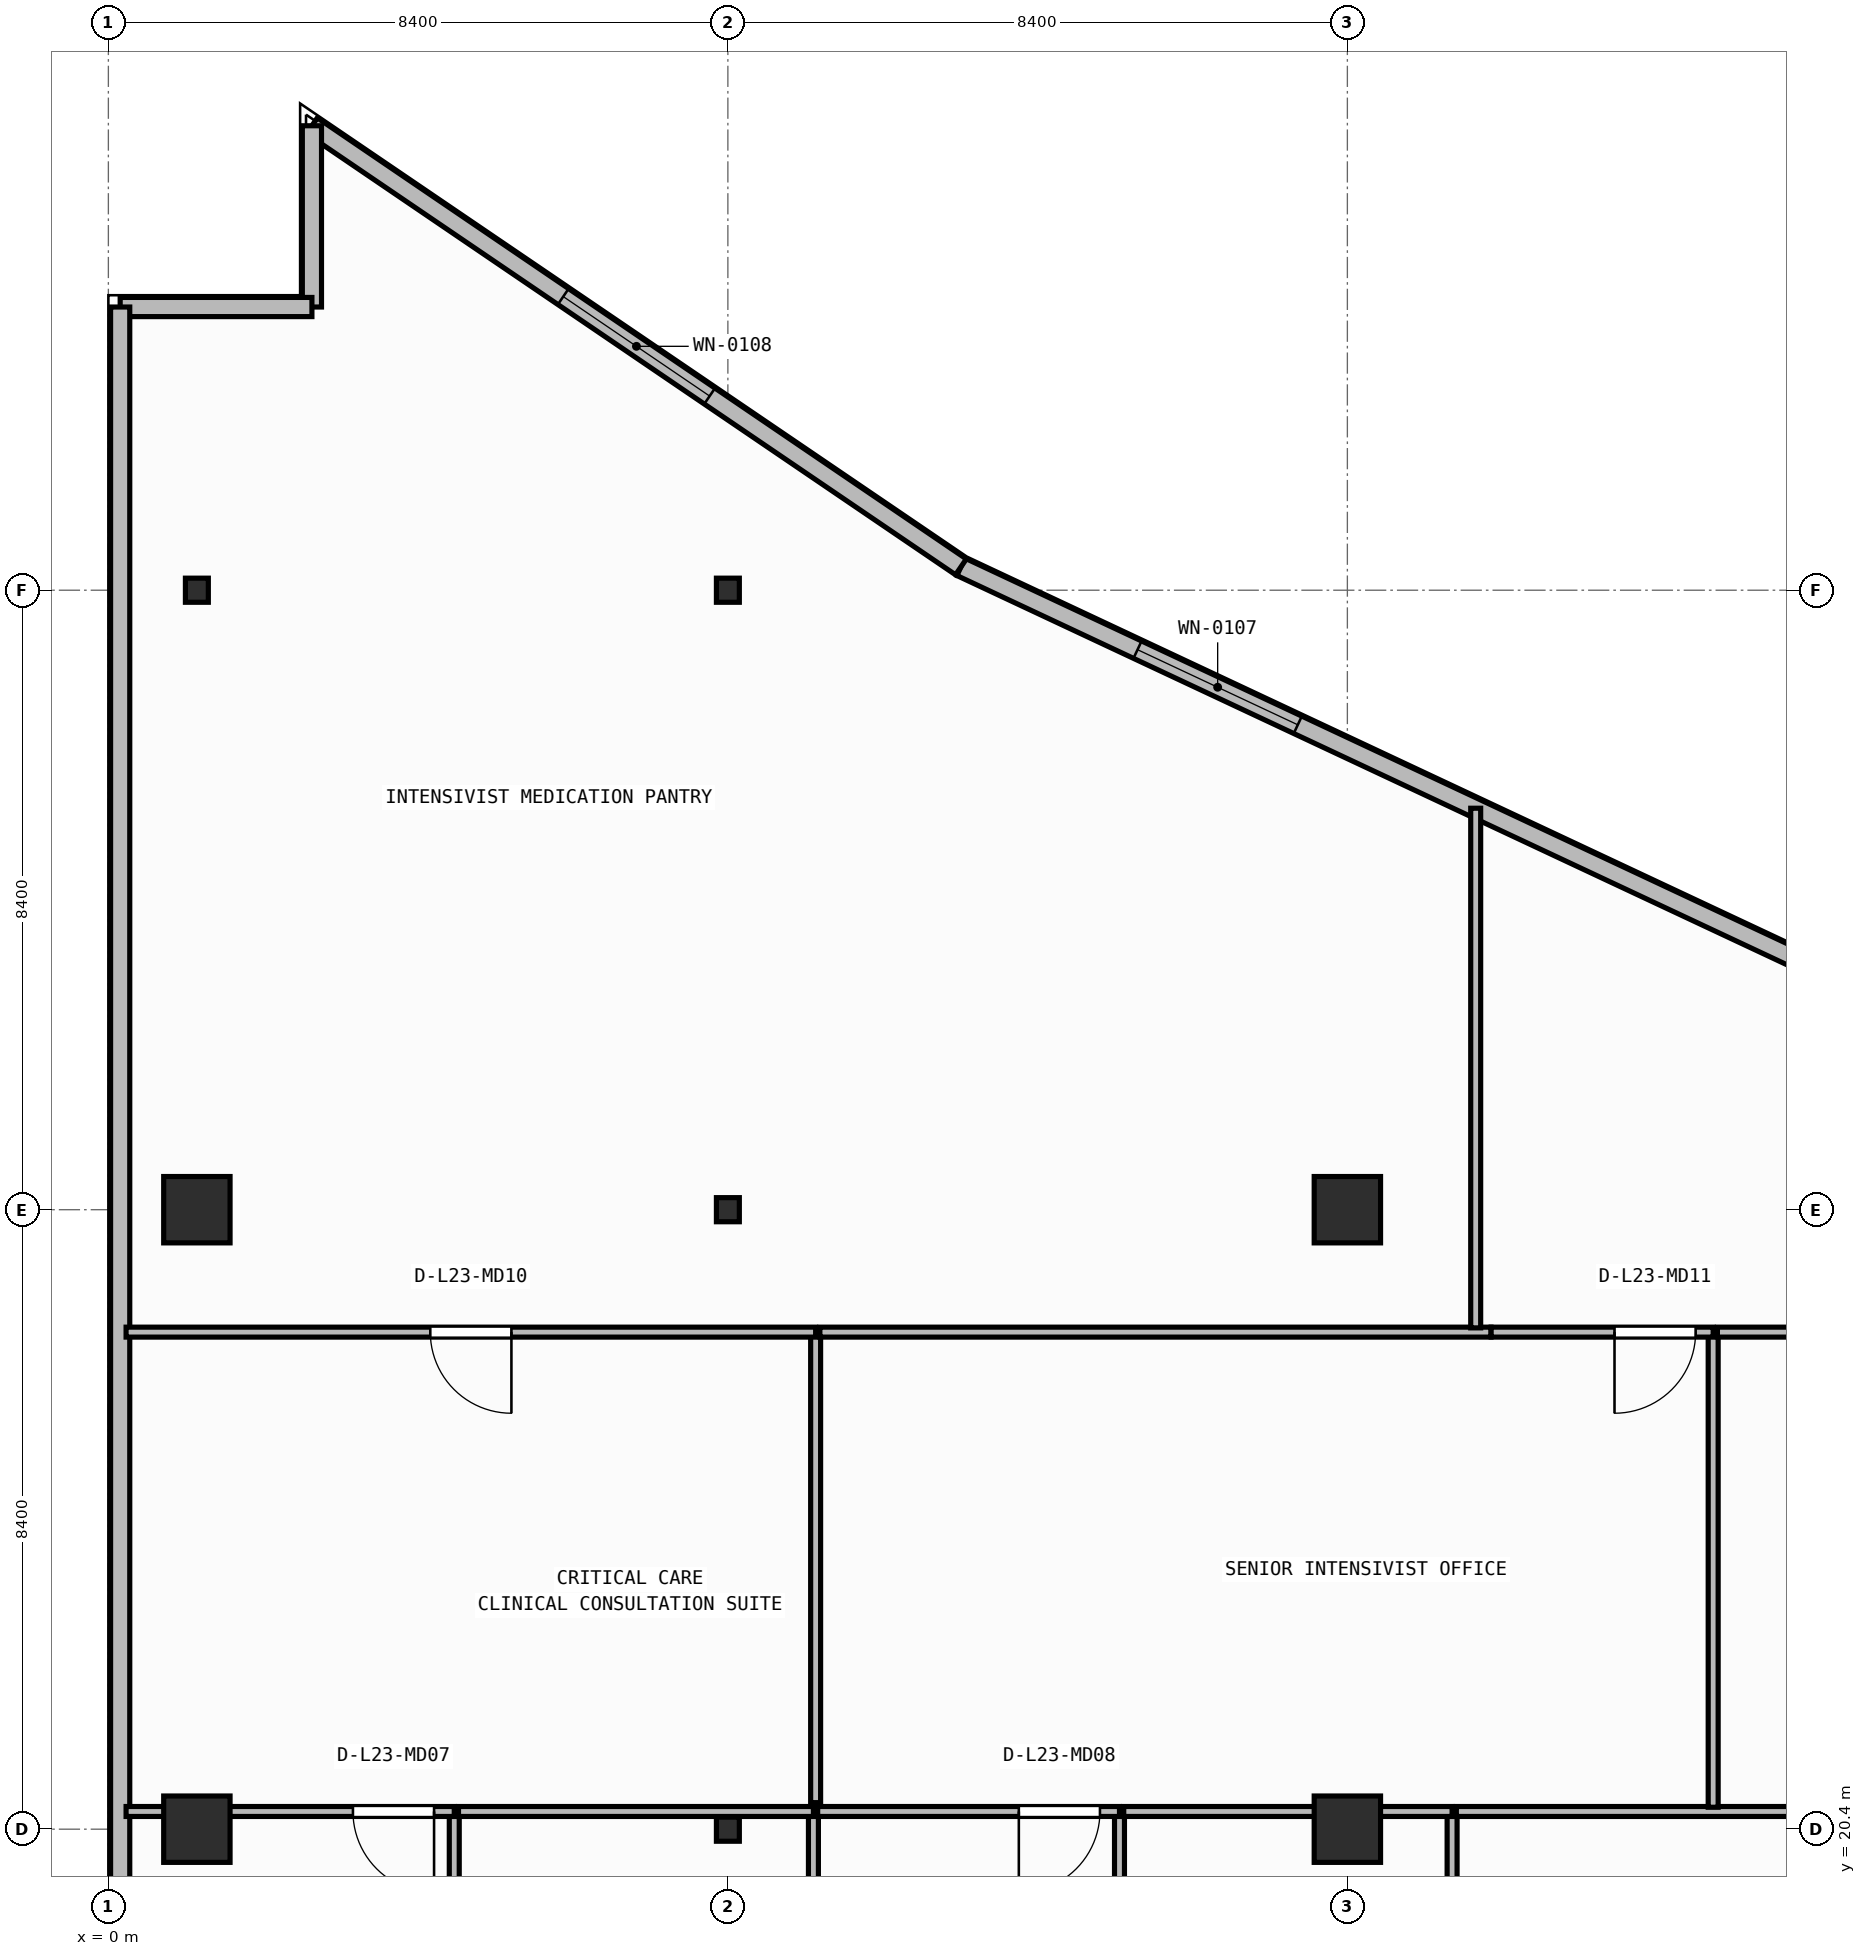
"""IFC4 building model, lengths in metres.
Left out: names, types, materials, properties, quantities, classifications, styles, units other than length and angle.
Written with IfcOpenShell. Run it as: python <this file> out.ifc"""

import sys

from ifc_helpers import new_model, si_unit, direction, frame, frame_2d, origin, origin_2d, place, context, subcontext, project, spatial, rectangle, i_section, extrude, element, fill, save


model = new_model("IFC4")
c1 = context("Model", 3, precision=1e-05, world=origin(), true_north=direction((0.0, 1.0)))
c2 = subcontext(c1, "Body", "Model", "MODEL_VIEW")
j1 = project(units=[si_unit("LENGTHUNIT", "METRE"), si_unit("PLANEANGLEUNIT", "RADIAN")], contexts=[c1])
p1 = place(None, origin())
s1 = spatial("IfcSite", under=j1, at=p1, CompositionType="ELEMENT")
p2 = place(p1, origin())
s2 = spatial("IfcBuilding", under=s1, at=p2, CompositionType="ELEMENT")
p3 = place(p2, frame((0.0, 0.0, 93.6)))
s3 = spatial("IfcBuildingStorey", under=s2, at=p3, CompositionType="ELEMENT", Elevation=93.6)
p4 = place(p3, frame((1.2, 20.4, 0.0), z_axis=(0.0, 0.0, 1.0), x_axis=(1.0, 0.0, 0.0)))
e1 = element("IfcColumn", 1, at=p4, inside=s3, PredefinedType="COLUMN", context=c2, shape_type="SweptSolid", body=[
    extrude(rectangle(XDim=0.9, YDim=0.9, at=origin_2d()), origin(), (0.0, 0.0, 1.0), 3.95),
])
p5 = place(p3, frame((8.4, 20.4, 0.0), z_axis=(0.0, 0.0, 1.0), x_axis=(1.0, 0.0, 0.0)))
e2 = element("IfcColumn", 2, at=p5, inside=s3, PredefinedType="COLUMN", context=c2, shape_type="SweptSolid", body=[
    extrude(i_section(OverallWidth=0.311, OverallDepth=0.327, WebThickness=0.016, FlangeThickness=0.025, FilletRadius=0.017, at=origin_2d()), origin(), (0.0, 0.0, 1.0), 3.95),
])
for number, where, z_axis, x_axis in (
    (3, (16.8, 20.4, 0.0), (0.0, 0.0, 1.0), (1.0, 0.0, 0.0)),
    (4, (1.2, 28.8, 0.0), (0.0, 0.0, 1.0), (1.0, 0.0, 0.0)),
):
    element("IfcColumn", number, at=place(p3, frame(where, z_axis=z_axis, x_axis=x_axis)), inside=s3, PredefinedType="COLUMN", context=c2, shape_type="SweptSolid", body=[
        extrude(rectangle(XDim=0.9, YDim=0.9, at=origin_2d()), origin(), (0.0, 0.0, 1.0), 3.95),
    ])
p6 = place(p3, frame((8.4, 28.8, 0.0), z_axis=(0.0, 0.0, 1.0), x_axis=(1.0, 0.0, 0.0)))
e5 = element("IfcColumn", 5, at=p6, inside=s3, PredefinedType="COLUMN", context=c2, shape_type="SweptSolid", body=[
    extrude(i_section(OverallWidth=0.311, OverallDepth=0.327, WebThickness=0.016, FlangeThickness=0.025, FilletRadius=0.017, at=origin_2d()), origin(), (0.0, 0.0, 1.0), 3.95),
])
p7 = place(p3, frame((16.8, 28.8, 0.0), z_axis=(0.0, 0.0, 1.0), x_axis=(1.0, 0.0, 0.0)))
e6 = element("IfcColumn", 6, at=p7, inside=s3, PredefinedType="COLUMN", context=c2, shape_type="SweptSolid", body=[
    extrude(rectangle(XDim=0.9, YDim=0.9, at=origin_2d()), origin(), (0.0, 0.0, 1.0), 3.95),
])
for number, where, z_axis, x_axis in (
    (7, (1.2, 37.2, 0.0), (0.0, 0.0, 1.0), (1.0, 0.0, 0.0)),
    (8, (8.4, 37.2, 0.0), (0.0, 0.0, 1.0), (1.0, 0.0, 0.0)),
):
    element("IfcColumn", number, at=place(p3, frame(where, z_axis=z_axis, x_axis=x_axis)), inside=s3, PredefinedType="COLUMN", context=c2, shape_type="SweptSolid", body=[
        extrude(i_section(OverallWidth=0.311, OverallDepth=0.327, WebThickness=0.016, FlangeThickness=0.025, FilletRadius=0.017, at=origin_2d()), origin(), (0.0, 0.0, 1.0), 3.95),
    ])
p8 = place(p3, frame((24.408, 31.492, 0.0), z_axis=(0.0, 0.0, 1.0), x_axis=(-0.905396522918, 0.424566998585, 0.0)))
e9 = element("IfcWall", 9, at=p8, inside=s3, PredefinedType="STANDARD", context=c2, shape_type="SweptSolid", body=[
    extrude(rectangle(XDim=14.189, YDim=0.26, at=frame_2d((7.095, 0.0))), origin(), (0.0, 0.0, 1.0), 3.67),
])
p9 = place(p8, frame((9.145, 0.0, 0.9)))
e10 = element("IfcOpeningElement", 10, at=p9, cuts=e9, PredefinedType="OPENING", context=c2, shape_type="SweptSolid", body=[
    extrude(rectangle(XDim=2.4, YDim=1.65, at=frame_2d((1.2, 0.825))), frame((0.0, 0.14, 0.0), z_axis=(0.0, -1.0, 0.0), x_axis=(1.0, 0.0, 0.0)), (0.0, 0.0, 1.0), 0.28),
])
p10 = place(p3, frame((11.561, 37.517, 0.0), z_axis=(0.0, 0.0, 1.0), x_axis=(-0.827064743936, 0.562106670782, 0.0)))
e11 = element("IfcWall", 11, at=p10, inside=s3, PredefinedType="STANDARD", context=c2, shape_type="SweptSolid", body=[
    extrude(rectangle(XDim=10.641, YDim=0.26, at=frame_2d((5.32, 0.0))), origin(), (0.0, 0.0, 1.0), 3.67),
])
p11 = place(p10, frame((4.12, 0.0, 0.9)))
e12 = element("IfcOpeningElement", 12, at=p11, cuts=e11, PredefinedType="OPENING", context=c2, shape_type="SweptSolid", body=[
    extrude(rectangle(XDim=2.4, YDim=1.65, at=frame_2d((1.2, 0.825))), frame((0.0, 0.14, 0.0), z_axis=(0.0, -1.0, 0.0), x_axis=(1.0, 0.0, 0.0)), (0.0, 0.0, 1.0), 0.28),
])
p12 = place(p3, frame((2.76, 43.498, 0.0), z_axis=(0.0, 0.0, 1.0), x_axis=(0.0, -1.0, 0.0)))
e13 = element("IfcWall", 13, at=p12, inside=s3, PredefinedType="STANDARD", context=c2, shape_type="SweptSolid", body=[
    extrude(rectangle(XDim=2.458, YDim=0.26, at=frame_2d((1.229, 0.0))), origin(), (0.0, 0.0, 1.0), 3.67),
])
p13 = place(p3, frame((2.76, 41.04, 0.0), z_axis=(0.0, 0.0, 1.0), x_axis=(-1.0, 0.0, 0.0)))
e14 = element("IfcWall", 14, at=p13, inside=s3, PredefinedType="STANDARD", context=c2, shape_type="SweptSolid", body=[
    extrude(rectangle(XDim=2.6, YDim=0.26, at=frame_2d((1.3, 0.0))), origin(), (0.0, 0.0, 1.0), 3.67),
])
p14 = place(p3, frame((0.16, 41.04, 0.0), z_axis=(0.0, 0.0, 1.0), x_axis=(0.0, -1.0, 0.0)))
e15 = element("IfcWall", 15, at=p14, inside=s3, PredefinedType="STANDARD", context=c2, shape_type="SweptSolid", body=[
    extrude(rectangle(XDim=38.28, YDim=0.26, at=frame_2d((19.14, 0.0))), origin(), (0.0, 0.0, 1.0), 3.67),
])
p15 = place(p14, frame((28.15, 0.0, 0.9)))
e16 = element("IfcOpeningElement", 16, at=p15, cuts=e15, PredefinedType="OPENING", context=c2, shape_type="SweptSolid", body=[
    extrude(rectangle(XDim=2.4, YDim=1.65, at=frame_2d((1.2, 0.825))), frame((0.0, 0.14, 0.0), z_axis=(0.0, -1.0, 0.0), x_axis=(1.0, 0.0, 0.0)), (0.0, 0.0, 1.0), 0.28),
])
p16 = place(p3, frame((4.69, 18.04, 0.0), z_axis=(0.0, 0.0, 1.0), x_axis=(0.0, 1.0, 0.0)))
e17 = element("IfcWall", 17, at=p16, inside=s3, PredefinedType="PARTITIONING", context=c2, shape_type="SweptSolid", body=[
    extrude(rectangle(XDim=2.6, YDim=0.135, at=frame_2d((1.3, 0.0))), origin(), (0.0, 0.0, 1.0), 3.67),
])
p17 = place(p3, frame((4.69, 20.64, 0.0), z_axis=(0.0, 0.0, 1.0), x_axis=(-1.0, 0.0, 0.0)))
e18 = element("IfcWall", 18, at=p17, inside=s3, PredefinedType="PARTITIONING", context=c2, shape_type="SweptSolid", body=[
    extrude(rectangle(XDim=4.45, YDim=0.135, at=frame_2d((2.225, 0.0))), origin(), (0.0, 0.0, 1.0), 3.033),
])
p18 = place(p17, frame((0.274, 0.0, 0.0)))
e19 = element("IfcOpeningElement", 19, at=p18, cuts=e18, PredefinedType="OPENING", context=c2, shape_type="SweptSolid", body=[
    extrude(rectangle(XDim=1.1, YDim=2.1, at=frame_2d((0.55, 1.05))), frame((0.0, 0.077, 0.0), z_axis=(0.0, -1.0, 0.0), x_axis=(1.0, 0.0, 0.0)), (0.0, 0.0, 1.0), 0.155),
])
p19 = place(p3, frame((9.56, 17.833, 0.0), z_axis=(0.0, 0.0, 1.0), x_axis=(0.0, 1.0, 0.0)))
e20 = element("IfcWall", 20, at=p19, inside=s3, PredefinedType="PARTITIONING", context=c2, shape_type="SweptSolid", body=[
    extrude(rectangle(XDim=2.807, YDim=0.135, at=frame_2d((1.404, 0.0))), origin(), (0.0, 0.0, 1.0), 3.67),
])
p20 = place(p3, frame((9.56, 20.64, 0.0), z_axis=(0.0, 0.0, 1.0), x_axis=(-1.0, 0.0, 0.0)))
e21 = element("IfcWall", 21, at=p20, inside=s3, PredefinedType="PARTITIONING", context=c2, shape_type="SweptSolid", body=[
    extrude(rectangle(XDim=4.812, YDim=0.135, at=frame_2d((2.406, 0.0))), origin(), (0.0, 0.0, 1.0), 3.033),
])
p21 = place(p3, frame((13.71, 14.76, 0.0), z_axis=(0.0, 0.0, 1.0), x_axis=(0.0, 1.0, 0.0)))
e22 = element("IfcWall", 22, at=p21, inside=s3, PredefinedType="PARTITIONING", context=c2, shape_type="SweptSolid", body=[
    extrude(rectangle(XDim=5.88, YDim=0.135, at=frame_2d((2.94, 0.0))), origin(), (0.0, 0.0, 1.0), 3.67),
])
p22 = place(p3, frame((13.71, 20.64, 0.0), z_axis=(0.0, 0.0, 1.0), x_axis=(-1.0, 0.0, 0.0)))
e23 = element("IfcWall", 23, at=p22, inside=s3, PredefinedType="PARTITIONING", context=c2, shape_type="SweptSolid", body=[
    extrude(rectangle(XDim=4.093, YDim=0.135, at=frame_2d((2.046, 0.0))), origin(), (0.0, 0.0, 1.0), 3.033),
])
p23 = place(p22, frame((0.265, 0.0, 0.0)))
e24 = element("IfcOpeningElement", 24, at=p23, cuts=e23, PredefinedType="OPENING", context=c2, shape_type="SweptSolid", body=[
    extrude(rectangle(XDim=1.1, YDim=2.1, at=frame_2d((0.55, 1.05))), frame((0.0, 0.077, 0.0), z_axis=(0.0, -1.0, 0.0), x_axis=(1.0, 0.0, 0.0)), (0.0, 0.0, 1.0), 0.155),
])
p24 = place(p3, frame((18.22, 17.833, 0.0), z_axis=(0.0, 0.0, 1.0), x_axis=(0.0, 1.0, 0.0)))
e25 = element("IfcWall", 25, at=p24, inside=s3, PredefinedType="PARTITIONING", context=c2, shape_type="SweptSolid", body=[
    extrude(rectangle(XDim=2.807, YDim=0.135, at=frame_2d((1.404, 0.0))), origin(), (0.0, 0.0, 1.0), 3.67),
])
p25 = place(p3, frame((18.22, 20.64, 0.0), z_axis=(0.0, 0.0, 1.0), x_axis=(-1.0, 0.0, 0.0)))
e26 = element("IfcWall", 26, at=p25, inside=s3, PredefinedType="PARTITIONING", context=c2, shape_type="SweptSolid", body=[
    extrude(rectangle(XDim=4.452, YDim=0.135, at=frame_2d((2.226, 0.0))), origin(), (0.0, 0.0, 1.0), 3.033),
])
p26 = place(p3, frame((23.032, 20.64, 0.0), z_axis=(0.0, 0.0, 1.0), x_axis=(-1.0, 0.0, 0.0)))
e27 = element("IfcWall", 27, at=p26, inside=s3, PredefinedType="PARTITIONING", context=c2, shape_type="SweptSolid", body=[
    extrude(rectangle(XDim=4.755, YDim=0.135, at=frame_2d((2.377, 0.0))), origin(), (0.0, 0.0, 1.0), 3.033),
])
p27 = place(p3, frame((9.59, 20.76, 0.0), z_axis=(0.0, 0.0, 1.0), x_axis=(0.0, 1.0, 0.0)))
e28 = element("IfcWall", 28, at=p27, inside=s3, PredefinedType="PARTITIONING", context=c2, shape_type="SweptSolid", body=[
    extrude(rectangle(XDim=6.38, YDim=0.135, at=frame_2d((3.19, 0.0))), origin(), (0.0, 0.0, 1.0), 3.67),
])
p28 = place(p3, frame((9.59, 27.14, 0.0), z_axis=(0.0, 0.0, 1.0), x_axis=(-1.0, 0.0, 0.0)))
e29 = element("IfcWall", 29, at=p28, inside=s3, PredefinedType="PARTITIONING", context=c2, shape_type="SweptSolid", body=[
    extrude(rectangle(XDim=9.35, YDim=0.135, at=frame_2d((4.675, 0.0))), origin(), (0.0, 0.0, 1.0), 3.67),
])
p29 = place(p28, frame((4.125, 0.0, 0.0)))
e30 = element("IfcOpeningElement", 30, at=p29, cuts=e29, PredefinedType="OPENING", context=c2, shape_type="SweptSolid", body=[
    extrude(rectangle(XDim=1.1, YDim=2.1, at=frame_2d((0.55, 1.05))), frame((0.0, 0.077, 0.0), z_axis=(0.0, -1.0, 0.0), x_axis=(1.0, 0.0, 0.0)), (0.0, 0.0, 1.0), 0.155),
])
p30 = place(p3, frame((21.76, 20.698, 0.0), z_axis=(0.0, 0.0, 1.0), x_axis=(0.0, 1.0, 0.0)))
e31 = element("IfcWall", 31, at=p30, inside=s3, PredefinedType="PARTITIONING", context=c2, shape_type="SweptSolid", body=[
    extrude(rectangle(XDim=6.442, YDim=0.135, at=frame_2d((3.221, 0.0))), origin(), (0.0, 0.0, 1.0), 3.67),
])
p31 = place(p3, frame((18.748, 27.14, 0.0), z_axis=(0.0, 0.0, 1.0), x_axis=(-1.0, 0.0, 0.0)))
e32 = element("IfcWall", 32, at=p31, inside=s3, PredefinedType="PARTITIONING", context=c2, shape_type="SweptSolid", body=[
    extrude(rectangle(XDim=9.1, YDim=0.135, at=frame_2d((4.55, 0.0))), origin(), (0.0, 0.0, 1.0), 3.67),
])
p32 = place(p3, frame((21.76, 27.14, 0.0), z_axis=(0.0, 0.0, 1.0), x_axis=(-1.0, 0.0, 0.0)))
e33 = element("IfcWall", 33, at=p32, inside=s3, PredefinedType="PARTITIONING", context=c2, shape_type="SweptSolid", body=[
    extrude(rectangle(XDim=3.01, YDim=0.135, at=frame_2d((1.505, 0.0))), origin(), (0.0, 0.0, 1.0), 3.67),
])
p33 = place(p32, frame((0.238, 0.0, 0.0)))
e34 = element("IfcOpeningElement", 34, at=p33, cuts=e33, PredefinedType="OPENING", context=c2, shape_type="SweptSolid", body=[
    extrude(rectangle(XDim=1.1, YDim=2.1, at=frame_2d((0.55, 1.05))), frame((0.0, 0.077, 0.0), z_axis=(0.0, -1.0, 0.0), x_axis=(1.0, 0.0, 0.0)), (0.0, 0.0, 1.0), 0.155),
])
p34 = place(p3, frame((38.45, 27.14, 0.0), z_axis=(0.0, 0.0, 1.0), x_axis=(-1.0, 0.0, 0.0)))
e35 = element("IfcWall", 35, at=p34, inside=s3, PredefinedType="PARTITIONING", context=c2, shape_type="SweptSolid", body=[
    extrude(rectangle(XDim=16.633, YDim=0.135, at=frame_2d((8.316, 0.0))), origin(), (0.0, 0.0, 1.0), 3.67),
])
p35 = place(p3, frame((18.54, 27.198, 0.0), z_axis=(0.0, 0.0, 1.0), x_axis=(0.0, 1.0, 0.0)))
e36 = element("IfcWall", 36, at=p35, inside=s3, PredefinedType="PARTITIONING", context=c2, shape_type="SweptSolid", body=[
    extrude(rectangle(XDim=7.046, YDim=0.135, at=frame_2d((3.523, 0.0))), origin(), (0.0, 0.0, 1.0), 3.67),
])
p36 = place(p9, origin())
e37 = element("IfcWindow", 37, at=p36, inside=s3, PartitioningType="SINGLE_PANEL", PredefinedType="WINDOW", context=c2, shape_type="SweptSolid", body=[
    extrude(rectangle(XDim=2.4, YDim=1.65, at=frame_2d((1.2, 0.825))), frame((0.0, 0.03, 0.0), z_axis=(0.0, -1.0, 0.0), x_axis=(1.0, 0.0, 0.0)), (0.0, 0.0, 1.0), 0.06),
])
fill(e10, e37)
p37 = place(p11, origin())
e38 = element("IfcWindow", 38, at=p37, inside=s3, PartitioningType="SINGLE_PANEL", PredefinedType="WINDOW", context=c2, shape_type="SweptSolid", body=[
    extrude(rectangle(XDim=2.4, YDim=1.65, at=frame_2d((1.2, 0.825))), frame((0.0, 0.03, 0.0), z_axis=(0.0, -1.0, 0.0), x_axis=(1.0, 0.0, 0.0)), (0.0, 0.0, 1.0), 0.06),
])
fill(e12, e38)
p38 = place(p18, origin())
e39 = element("IfcDoor", 39, at=p38, inside=s3, OperationType="SINGLE_SWING_LEFT", PredefinedType="DOOR", context=c2, shape_type="SweptSolid", body=[
    extrude(rectangle(XDim=1.1, YDim=2.1, at=frame_2d((0.55, 1.05))), frame((0.0, 0.025, 0.0), z_axis=(0.0, -1.0, 0.0), x_axis=(1.0, 0.0, 0.0)), (0.0, 0.0, 1.0), 0.05),
])
fill(e19, e39)
p39 = place(p23, origin())
e40 = element("IfcDoor", 40, at=p39, inside=s3, OperationType="SINGLE_SWING_RIGHT", PredefinedType="DOOR", context=c2, shape_type="SweptSolid", body=[
    extrude(rectangle(XDim=1.1, YDim=2.1, at=frame_2d((0.55, 1.05))), frame((0.0, 0.025, 0.0), z_axis=(0.0, -1.0, 0.0), x_axis=(1.0, 0.0, 0.0)), (0.0, 0.0, 1.0), 0.05),
])
fill(e24, e40)
p40 = place(p29, origin())
e41 = element("IfcDoor", 41, at=p40, inside=s3, OperationType="SINGLE_SWING_LEFT", PredefinedType="DOOR", context=c2, shape_type="SweptSolid", body=[
    extrude(rectangle(XDim=1.1, YDim=2.1, at=frame_2d((0.55, 1.05))), frame((0.0, 0.025, 0.0), z_axis=(0.0, -1.0, 0.0), x_axis=(1.0, 0.0, 0.0)), (0.0, 0.0, 1.0), 0.05),
])
fill(e30, e41)
p41 = place(p33, origin())
e42 = element("IfcDoor", 42, at=p41, inside=s3, OperationType="SINGLE_SWING_RIGHT", PredefinedType="DOOR", context=c2, shape_type="SweptSolid", body=[
    extrude(rectangle(XDim=1.1, YDim=2.1, at=frame_2d((0.55, 1.05))), frame((0.0, 0.025, 0.0), z_axis=(0.0, -1.0, 0.0), x_axis=(1.0, 0.0, 0.0)), (0.0, 0.0, 1.0), 0.05),
])
fill(e34, e42)
save(model, sys.argv[1])
